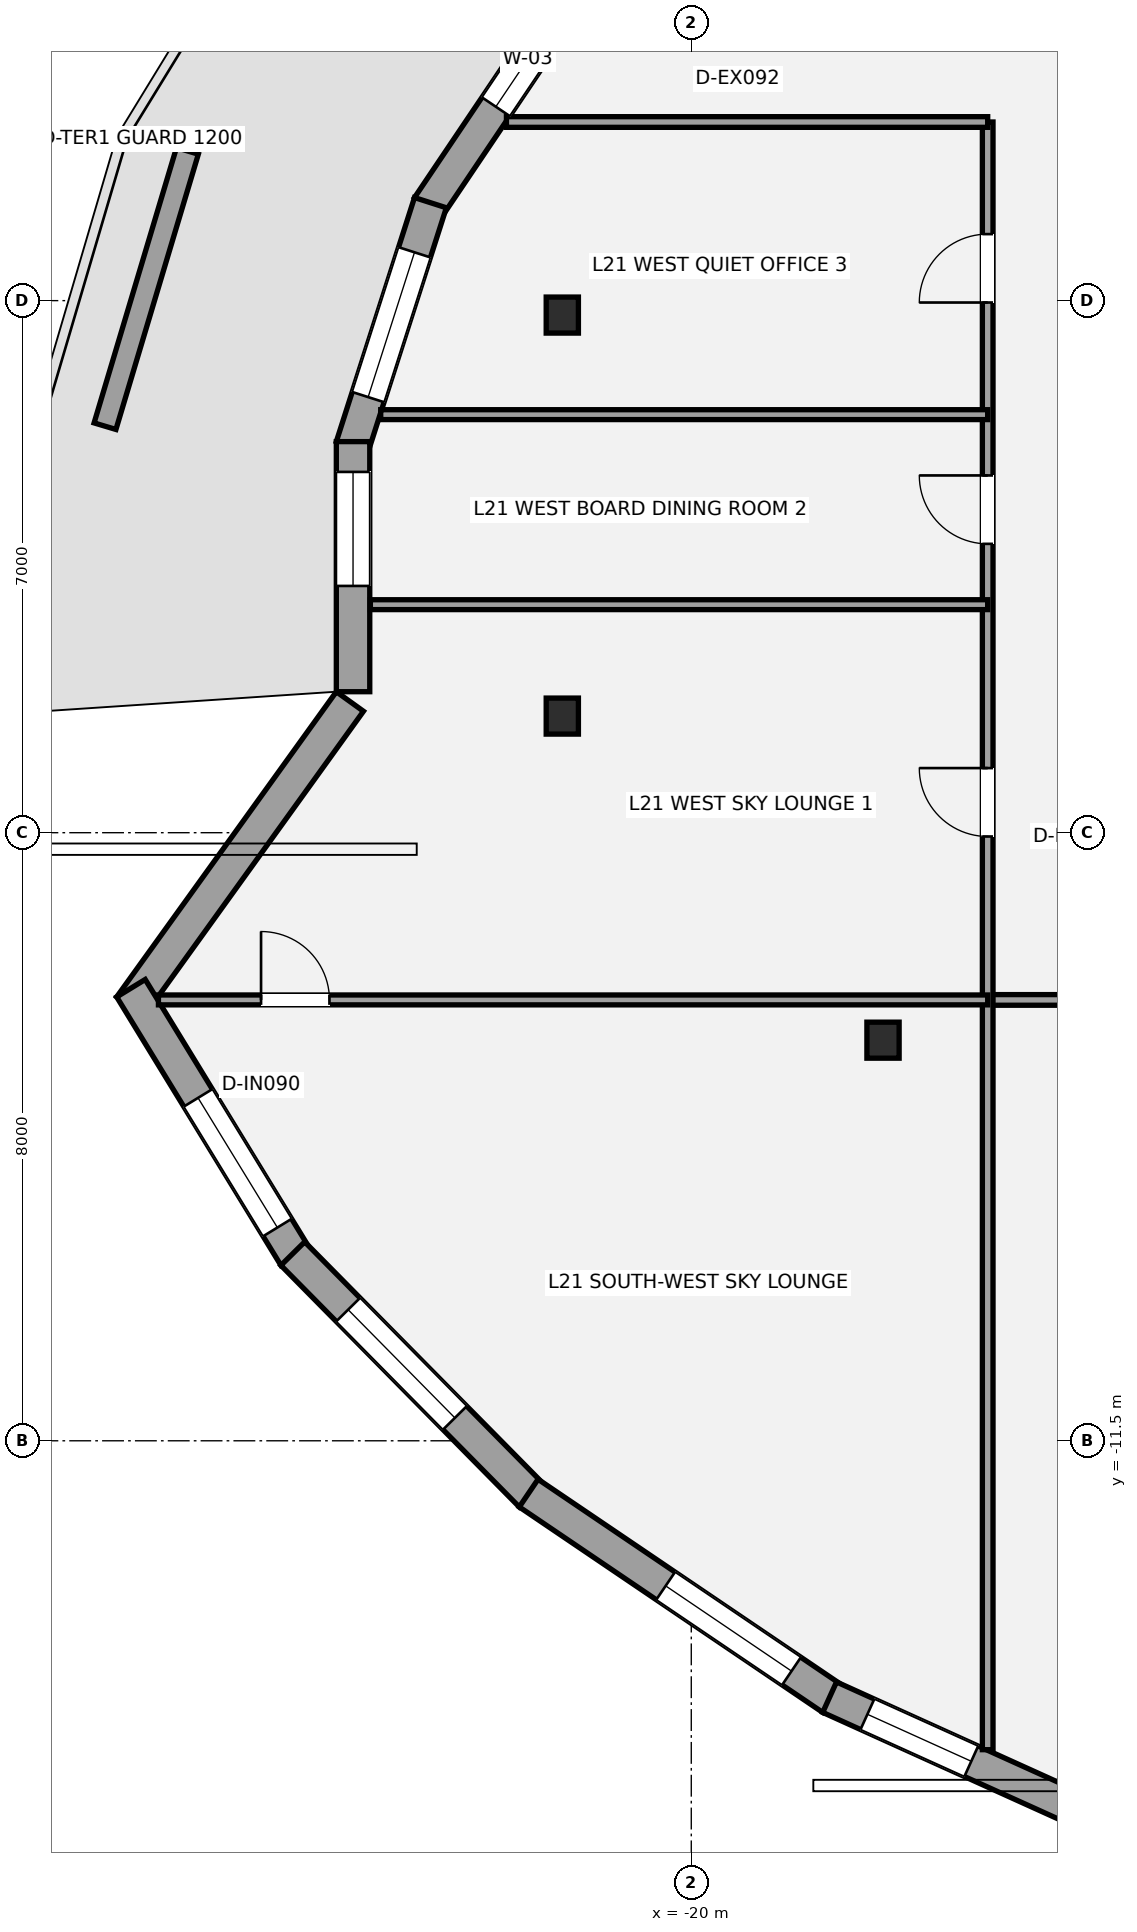
"""IFC4 building model, lengths in metres.
Left out: names, types, materials, properties, quantities, classifications, styles, units other than length and angle.
Written with IfcOpenShell. Run it as: python <this file> out.ifc"""

import sys

from ifc_helpers import new_model, si_unit, direction, frame, frame_2d, origin, origin_2d, place, context, subcontext, project, spatial, rectangle, i_section, extrude, element, fill, save


model = new_model("IFC4")
c1 = context("Model", 3, precision=1e-05, world=origin(), true_north=direction((0.0, 1.0)))
c2 = subcontext(c1, "Body", "Model", "MODEL_VIEW")
j1 = project(units=[si_unit("LENGTHUNIT", "METRE"), si_unit("PLANEANGLEUNIT", "RADIAN")], contexts=[c1])
p1 = place(None, origin())
s1 = spatial("IfcSite", under=j1, at=p1, CompositionType="ELEMENT")
p2 = place(p1, origin())
s2 = spatial("IfcBuilding", under=s1, at=p2, CompositionType="ELEMENT")
p3 = place(p2, frame((0.0, 0.0, 81.9)))
s3 = spatial("IfcBuildingStorey", under=s2, at=p3, CompositionType="ELEMENT", Elevation=81.9)
for number, where, z_axis, x_axis in (
    (1, (-21.697, 3.31, 0.0), (0.0, 0.0, 1.0), (1.0, 0.0, 0.0)),
    (2, (-21.697, -1.966, 0.0), (0.0, 0.0, 1.0), (1.0, 0.0, 0.0)),
    (3, (-17.477, -6.229, 0.0), (0.0, 0.0, 1.0), (1.0, 0.0, 0.0)),
):
    element("IfcColumn", number, at=place(p3, frame(where, z_axis=z_axis, x_axis=x_axis)), inside=s3, PredefinedType="COLUMN", context=c2, shape_type="SweptSolid", body=[
        extrude(i_section(OverallWidth=0.424, OverallDepth=0.474, WebThickness=0.048, FlangeThickness=0.077, at=origin_2d()), origin(), (0.0, 0.0, 1.0), 4.2),
    ])
p4 = place(p3, frame((-23.459, 4.733, 0.0), z_axis=(0.0, 0.0, 1.0), x_axis=(0.558605157635, 0.829433709143, 0.0)))
e4 = element("IfcWall", 4, at=p4, inside=s3, PredefinedType="STANDARD", context=c2, shape_type="SweptSolid", body=[
    extrude(rectangle(XDim=3.587, YDim=0.44, at=frame_2d((1.793, 0.0))), origin(), (0.0, 0.0, 1.0), 3.232),
])
p5 = place(p4, frame((1.589, 0.0, 0.6)))
e5 = element("IfcOpeningElement", 5, at=p5, cuts=e4, PredefinedType="OPENING", context=c2, shape_type="SweptSolid", body=[
    extrude(rectangle(XDim=1.5, YDim=1.7, at=frame_2d((0.75, 0.85))), frame((0.0, 0.23, 0.0), z_axis=(0.0, -1.0, 0.0), x_axis=(1.0, 0.0, 0.0)), (0.0, 0.0, 1.0), 0.46),
])
p6 = place(p3, frame((-24.461, 1.578, 0.0), z_axis=(0.0, 0.0, 1.0), x_axis=(0.305062094241, 0.952332462251, 0.0)))
e6 = element("IfcWall", 6, at=p6, inside=s3, PredefinedType="STANDARD", context=c2, shape_type="SweptSolid", body=[
    extrude(rectangle(XDim=3.372, YDim=0.44, at=frame_2d((1.686, 0.0))), origin(), (0.0, 0.0, 1.0), 3.232),
])
p7 = place(p6, frame((0.686, 0.0, 0.6)))
e7 = element("IfcOpeningElement", 7, at=p7, cuts=e6, PredefinedType="OPENING", context=c2, shape_type="SweptSolid", body=[
    extrude(rectangle(XDim=2.0, YDim=2.1, at=frame_2d((1.0, 1.05))), frame((0.0, 0.23, 0.0), z_axis=(0.0, -1.0, 0.0), x_axis=(1.0, 0.0, 0.0)), (0.0, 0.0, 1.0), 0.46),
])
p8 = place(p3, frame((-24.45, -1.645, 0.0), z_axis=(0.0, 0.0, 1.0), x_axis=(0.0, 1.0, 0.0)))
e8 = element("IfcWall", 8, at=p8, inside=s3, PredefinedType="STANDARD", context=c2, shape_type="SweptSolid", body=[
    extrude(rectangle(XDim=3.29, YDim=0.44, at=frame_2d((1.645, 0.0))), origin(), (0.0, 0.0, 1.0), 3.232),
])
p9 = place(p8, frame((1.392, 0.0, 0.6)))
e9 = element("IfcOpeningElement", 9, at=p9, cuts=e8, PredefinedType="OPENING", context=c2, shape_type="SweptSolid", body=[
    extrude(rectangle(XDim=1.5, YDim=1.7, at=frame_2d((0.75, 0.85))), frame((0.0, 0.23, 0.0), z_axis=(0.0, -1.0, 0.0), x_axis=(1.0, 0.0, 0.0)), (0.0, 0.0, 1.0), 0.46),
])
p10 = place(p3, frame((-27.381, -5.789, 0.0), z_axis=(0.0, 0.0, 1.0), x_axis=(0.584114899474, 0.811670982734, 0.0)))
e10 = element("IfcWall", 10, at=p10, inside=s3, PredefinedType="STANDARD", context=c2, shape_type="SweptSolid", body=[
    extrude(rectangle(XDim=4.947, YDim=0.44, at=frame_2d((2.474, 0.0))), origin(), (0.0, 0.0, 1.0), 3.232),
])
p11 = place(p3, frame((-25.212, -9.077, 0.0), z_axis=(0.0, 0.0, 1.0), x_axis=(-0.521891226532, 0.85301204427, 0.0)))
e11 = element("IfcWall", 11, at=p11, inside=s3, PredefinedType="STANDARD", context=c2, shape_type="SweptSolid", body=[
    extrude(rectangle(XDim=4.14, YDim=0.44, at=frame_2d((2.07, 0.0))), origin(), (0.0, 0.0, 1.0), 3.228),
])
p12 = place(p11, frame((0.448, 0.0, 0.6)))
e12 = element("IfcOpeningElement", 12, at=p12, cuts=e11, PredefinedType="OPENING", context=c2, shape_type="SweptSolid", body=[
    extrude(rectangle(XDim=2.0, YDim=2.1, at=frame_2d((1.0, 1.05))), frame((0.0, 0.23, 0.0), z_axis=(0.0, -1.0, 0.0), x_axis=(1.0, 0.0, 0.0)), (0.0, 0.0, 1.0), 0.46),
])
p13 = place(p3, frame((-22.106, -12.216, 0.0), z_axis=(0.0, 0.0, 1.0), x_axis=(-0.702361901729, 0.711820032733, 0.0)))
e13 = element("IfcWall", 13, at=p13, inside=s3, PredefinedType="STANDARD", context=c2, shape_type="SweptSolid", body=[
    extrude(rectangle(XDim=4.466, YDim=0.44, at=frame_2d((2.233, 0.0))), origin(), (0.0, 0.0, 1.0), 3.232),
])
p14 = place(p13, frame((1.429, 0.0, 0.6)))
e14 = element("IfcOpeningElement", 14, at=p14, cuts=e13, PredefinedType="OPENING", context=c2, shape_type="SweptSolid", body=[
    extrude(rectangle(XDim=2.0, YDim=2.1, at=frame_2d((1.0, 1.05))), frame((0.0, 0.23, 0.0), z_axis=(0.0, -1.0, 0.0), x_axis=(1.0, 0.0, 0.0)), (0.0, 0.0, 1.0), 0.46),
])
p15 = place(p3, frame((-18.147, -14.892, 0.0), z_axis=(0.0, 0.0, 1.0), x_axis=(-0.82804003003, 0.560668983151, 0.0)))
e15 = element("IfcWall", 15, at=p15, inside=s3, PredefinedType="STANDARD", context=c2, shape_type="SweptSolid", body=[
    extrude(rectangle(XDim=4.821, YDim=0.44, at=frame_2d((2.411, 0.0))), origin(), (0.0, 0.0, 1.0), 3.232),
])
p16 = place(p15, frame((0.645, 0.0, 0.6)))
e16 = element("IfcOpeningElement", 16, at=p16, cuts=e15, PredefinedType="OPENING", context=c2, shape_type="SweptSolid", body=[
    extrude(rectangle(XDim=2.0, YDim=2.1, at=frame_2d((1.0, 1.05))), frame((0.0, 0.23, 0.0), z_axis=(0.0, -1.0, 0.0), x_axis=(1.0, 0.0, 0.0)), (0.0, 0.0, 1.0), 0.46),
])
p17 = place(p3, frame((-13.39, -17.04, 0.0), z_axis=(0.0, 0.0, 1.0), x_axis=(-0.911095050479, 0.412196323362, 0.0)))
e17 = element("IfcWall", 17, at=p17, inside=s3, PredefinedType="STANDARD", context=c2, shape_type="SweptSolid", body=[
    extrude(rectangle(XDim=5.257, YDim=0.44, at=frame_2d((2.628, 0.0))), origin(), (0.0, 0.0, 1.0), 3.228),
])
p18 = place(p17, frame((3.212, 0.0, 0.6)))
e18 = element("IfcOpeningElement", 18, at=p18, cuts=e17, PredefinedType="OPENING", context=c2, shape_type="SweptSolid", body=[
    extrude(rectangle(XDim=1.5, YDim=1.7, at=frame_2d((0.75, 0.85))), frame((0.0, 0.23, 0.0), z_axis=(0.0, -1.0, 0.0), x_axis=(1.0, 0.0, 0.0)), (0.0, 0.0, 1.0), 0.46),
])
p19 = place(p3, frame((-26.629, 5.469, 0.0), z_axis=(0.0, 0.0, 1.0), x_axis=(-0.286761226144, -0.958002087252, 0.0)))
e19 = element("IfcWall", 19, at=p19, inside=s3, PredefinedType="PARAPET", context=c2, shape_type="SweptSolid", body=[
    extrude(rectangle(XDim=3.78, YDim=0.3, at=frame_2d((1.89, 0.0))), origin(), (0.0, 0.0, 1.0), 0.45),
])
p20 = place(p3, frame((-16.1, -5.7, 0.0), z_axis=(0.0, 0.0, 1.0), x_axis=(1.0, 0.0, 0.0)))
e20 = element("IfcWall", 20, at=p20, inside=s3, PredefinedType="PARTITIONING", context=c2, shape_type="SweptSolid", body=[
    extrude(rectangle(XDim=32.2, YDim=0.14, at=frame_2d((16.1, 0.0))), origin(), (0.0, 0.0, 1.0), 3.463),
])
p21 = place(p20, frame((4.35, 0.0, 0.0)))
e21 = element("IfcOpeningElement", 21, at=p21, cuts=e20, PredefinedType="OPENING", context=c2, shape_type="SweptSolid", body=[
    extrude(rectangle(XDim=0.9, YDim=2.1, at=frame_2d((0.45, 1.05))), frame((0.0, 0.08, 0.0), z_axis=(0.0, -1.0, 0.0), x_axis=(1.0, 0.0, 0.0)), (0.0, 0.0, 1.0), 0.16),
])
p22 = place(p20, frame((15.65, 0.0, 0.0)))
e22 = element("IfcOpeningElement", 22, at=p22, cuts=e20, PredefinedType="OPENING", context=c2, shape_type="SweptSolid", body=[
    extrude(rectangle(XDim=0.9, YDim=2.1, at=frame_2d((0.45, 1.05))), frame((0.0, 0.08, 0.0), z_axis=(0.0, -1.0, 0.0), x_axis=(1.0, 0.0, 0.0)), (0.0, 0.0, 1.0), 0.16),
])
p23 = place(p20, frame((26.95, 0.0, 0.0)))
e23 = element("IfcOpeningElement", 23, at=p23, cuts=e20, PredefinedType="OPENING", context=c2, shape_type="SweptSolid", body=[
    extrude(rectangle(XDim=0.9, YDim=2.1, at=frame_2d((0.45, 1.05))), frame((0.0, 0.08, 0.0), z_axis=(0.0, -1.0, 0.0), x_axis=(1.0, 0.0, 0.0)), (0.0, 0.0, 1.0), 0.16),
])
p24 = place(p3, frame((-16.1, -15.564, 0.0), z_axis=(0.0, 0.0, 1.0), x_axis=(0.0, 1.0, 0.0)))
e24 = element("IfcWall", 24, at=p24, inside=s3, PredefinedType="PARTITIONING", context=c2, shape_type="SweptSolid", body=[
    extrude(rectangle(XDim=21.414, YDim=0.14, at=frame_2d((10.707, 0.0))), origin(), (0.0, 0.0, 1.0), 3.451),
])
p25 = place(p24, frame((12.014, 0.0, 0.0)))
e25 = element("IfcOpeningElement", 25, at=p25, cuts=e24, PredefinedType="OPENING", context=c2, shape_type="SweptSolid", body=[
    extrude(rectangle(XDim=0.9, YDim=2.1, at=frame_2d((0.45, 1.05))), frame((0.0, 0.08, 0.0), z_axis=(0.0, -1.0, 0.0), x_axis=(1.0, 0.0, 0.0)), (0.0, 0.0, 1.0), 0.16),
])
p26 = place(p24, frame((15.864, 0.0, 0.0)))
e26 = element("IfcOpeningElement", 26, at=p26, cuts=e24, PredefinedType="OPENING", context=c2, shape_type="SweptSolid", body=[
    extrude(rectangle(XDim=0.9, YDim=2.1, at=frame_2d((0.45, 1.05))), frame((0.0, 0.08, 0.0), z_axis=(0.0, -1.0, 0.0), x_axis=(1.0, 0.0, 0.0)), (0.0, 0.0, 1.0), 0.16),
])
p27 = place(p24, frame((19.039, 0.0, 0.0)))
e27 = element("IfcOpeningElement", 27, at=p27, cuts=e24, PredefinedType="OPENING", context=c2, shape_type="SweptSolid", body=[
    extrude(rectangle(XDim=0.9, YDim=2.1, at=frame_2d((0.45, 1.05))), frame((0.0, 0.08, 0.0), z_axis=(0.0, -1.0, 0.0), x_axis=(1.0, 0.0, 0.0)), (0.0, 0.0, 1.0), 0.16),
])
p28 = place(p3, frame((-22.432, 5.85, 0.0), z_axis=(0.0, 0.0, 1.0), x_axis=(1.0, 0.0, 0.0)))
e28 = element("IfcWall", 28, at=p28, inside=s3, PredefinedType="PARTITIONING", context=c2, shape_type="SweptSolid", body=[
    extrude(rectangle(XDim=6.332, YDim=0.14, at=frame_2d((3.166, 0.0))), origin(), (0.0, 0.0, 1.0), 3.463),
])
p29 = place(p3, frame((-27.01, -5.7, 0.0), z_axis=(0.0, 0.0, 1.0), x_axis=(1.0, 0.0, 0.0)))
e29 = element("IfcWall", 29, at=p29, inside=s3, PredefinedType="PARTITIONING", context=c2, shape_type="SweptSolid", body=[
    extrude(rectangle(XDim=10.91, YDim=0.13, at=frame_2d((5.455, 0.0))), origin(), (0.0, 0.0, 1.0), 3.388),
])
p30 = place(p29, frame((1.35, 0.0, 0.0)))
e30 = element("IfcOpeningElement", 30, at=p30, cuts=e29, PredefinedType="OPENING", context=c2, shape_type="SweptSolid", body=[
    extrude(rectangle(XDim=0.9, YDim=2.1, at=frame_2d((0.45, 1.05))), frame((0.0, 0.075, 0.0), z_axis=(0.0, -1.0, 0.0), x_axis=(1.0, 0.0, 0.0)), (0.0, 0.0, 1.0), 0.15),
])
p31 = place(p3, frame((-24.222, -0.5, 0.0), z_axis=(0.0, 0.0, 1.0), x_axis=(1.0, 0.0, 0.0)))
e31 = element("IfcWall", 31, at=p31, inside=s3, PredefinedType="PARTITIONING", context=c2, shape_type="SweptSolid", body=[
    extrude(rectangle(XDim=8.122, YDim=0.13, at=frame_2d((4.061, 0.0))), origin(), (0.0, 0.0, 1.0), 3.451),
])
p32 = place(p3, frame((-24.086, 2.0, 0.0), z_axis=(0.0, 0.0, 1.0), x_axis=(1.0, 0.0, 0.0)))
e32 = element("IfcWall", 32, at=p32, inside=s3, PredefinedType="PARTITIONING", context=c2, shape_type="SweptSolid", body=[
    extrude(rectangle(XDim=7.986, YDim=0.13, at=frame_2d((3.993, 0.0))), origin(), (0.0, 0.0, 1.0), 3.451),
])
p33 = place(p5, origin())
e33 = element("IfcWindow", 33, at=p33, inside=s3, PartitioningType="SINGLE_PANEL", PredefinedType="WINDOW", context=c2, shape_type="SweptSolid", body=[
    extrude(rectangle(XDim=1.5, YDim=1.7, at=frame_2d((0.75, 0.85))), frame((0.0, -0.01, 0.0), z_axis=(0.0, -1.0, 0.0), x_axis=(1.0, 0.0, 0.0)), (0.0, 0.0, 1.0), 0.06),
])
fill(e5, e33)
p34 = place(p7, origin())
e34 = element("IfcWindow", 34, at=p34, inside=s3, PartitioningType="SINGLE_PANEL", PredefinedType="WINDOW", context=c2, shape_type="SweptSolid", body=[
    extrude(rectangle(XDim=2.0, YDim=2.1, at=frame_2d((1.0, 1.05))), frame((0.0, -0.01, 0.0), z_axis=(0.0, -1.0, 0.0), x_axis=(1.0, 0.0, 0.0)), (0.0, 0.0, 1.0), 0.06),
])
fill(e7, e34)
p35 = place(p9, origin())
e35 = element("IfcWindow", 35, at=p35, inside=s3, PartitioningType="SINGLE_PANEL", PredefinedType="WINDOW", context=c2, shape_type="SweptSolid", body=[
    extrude(rectangle(XDim=1.5, YDim=1.7, at=frame_2d((0.75, 0.85))), frame((0.0, -0.01, 0.0), z_axis=(0.0, -1.0, 0.0), x_axis=(1.0, 0.0, 0.0)), (0.0, 0.0, 1.0), 0.06),
])
fill(e9, e35)
p36 = place(p12, origin())
e36 = element("IfcWindow", 36, at=p36, inside=s3, PartitioningType="SINGLE_PANEL", PredefinedType="WINDOW", context=c2, shape_type="SweptSolid", body=[
    extrude(rectangle(XDim=2.0, YDim=2.1, at=frame_2d((1.0, 1.05))), frame((0.0, -0.01, 0.0), z_axis=(0.0, -1.0, 0.0), x_axis=(1.0, 0.0, 0.0)), (0.0, 0.0, 1.0), 0.06),
])
fill(e12, e36)
p37 = place(p14, origin())
e37 = element("IfcWindow", 37, at=p37, inside=s3, PartitioningType="SINGLE_PANEL", PredefinedType="WINDOW", context=c2, shape_type="SweptSolid", body=[
    extrude(rectangle(XDim=2.0, YDim=2.1, at=frame_2d((1.0, 1.05))), frame((0.0, -0.01, 0.0), z_axis=(0.0, -1.0, 0.0), x_axis=(1.0, 0.0, 0.0)), (0.0, 0.0, 1.0), 0.06),
])
fill(e14, e37)
p38 = place(p16, origin())
e38 = element("IfcWindow", 38, at=p38, inside=s3, PartitioningType="SINGLE_PANEL", PredefinedType="WINDOW", context=c2, shape_type="SweptSolid", body=[
    extrude(rectangle(XDim=2.0, YDim=2.1, at=frame_2d((1.0, 1.05))), frame((0.0, -0.01, 0.0), z_axis=(0.0, -1.0, 0.0), x_axis=(1.0, 0.0, 0.0)), (0.0, 0.0, 1.0), 0.06),
])
fill(e16, e38)
p39 = place(p18, origin())
e39 = element("IfcWindow", 39, at=p39, inside=s3, PartitioningType="SINGLE_PANEL", PredefinedType="WINDOW", context=c2, shape_type="SweptSolid", body=[
    extrude(rectangle(XDim=1.5, YDim=1.7, at=frame_2d((0.75, 0.85))), frame((0.0, -0.01, 0.0), z_axis=(0.0, -1.0, 0.0), x_axis=(1.0, 0.0, 0.0)), (0.0, 0.0, 1.0), 0.06),
])
fill(e18, e39)
p40 = place(p30, origin())
e40 = element("IfcDoor", 40, at=p40, inside=s3, OperationType="SINGLE_SWING_LEFT", PredefinedType="DOOR", context=c2, shape_type="SweptSolid", body=[
    extrude(rectangle(XDim=0.9, YDim=2.1, at=frame_2d((0.45, 1.05))), frame((0.0, 0.025, 0.0), z_axis=(0.0, -1.0, 0.0), x_axis=(1.0, 0.0, 0.0)), (0.0, 0.0, 1.0), 0.05),
])
fill(e30, e40)
p41 = place(p25, origin())
e41 = element("IfcDoor", 41, at=p41, inside=s3, OperationType="SINGLE_SWING_RIGHT", PredefinedType="DOOR", context=c2, shape_type="SweptSolid", body=[
    extrude(rectangle(XDim=0.9, YDim=2.1, at=frame_2d((0.45, 1.05))), frame((0.0, 0.025, 0.0), z_axis=(0.0, -1.0, 0.0), x_axis=(1.0, 0.0, 0.0)), (0.0, 0.0, 1.0), 0.05),
])
fill(e25, e41)
p42 = place(p26, origin())
e42 = element("IfcDoor", 42, at=p42, inside=s3, OperationType="SINGLE_SWING_RIGHT", PredefinedType="DOOR", context=c2, shape_type="SweptSolid", body=[
    extrude(rectangle(XDim=0.9, YDim=2.1, at=frame_2d((0.45, 1.05))), frame((0.0, 0.025, 0.0), z_axis=(0.0, -1.0, 0.0), x_axis=(1.0, 0.0, 0.0)), (0.0, 0.0, 1.0), 0.05),
])
fill(e26, e42)
p43 = place(p27, origin())
e43 = element("IfcDoor", 43, at=p43, inside=s3, OperationType="SINGLE_SWING_LEFT", PredefinedType="DOOR", context=c2, shape_type="SweptSolid", body=[
    extrude(rectangle(XDim=0.9, YDim=2.1, at=frame_2d((0.45, 1.05))), frame((0.0, 0.025, 0.0), z_axis=(0.0, -1.0, 0.0), x_axis=(1.0, 0.0, 0.0)), (0.0, 0.0, 1.0), 0.05),
])
fill(e27, e43)
save(model, sys.argv[1])
